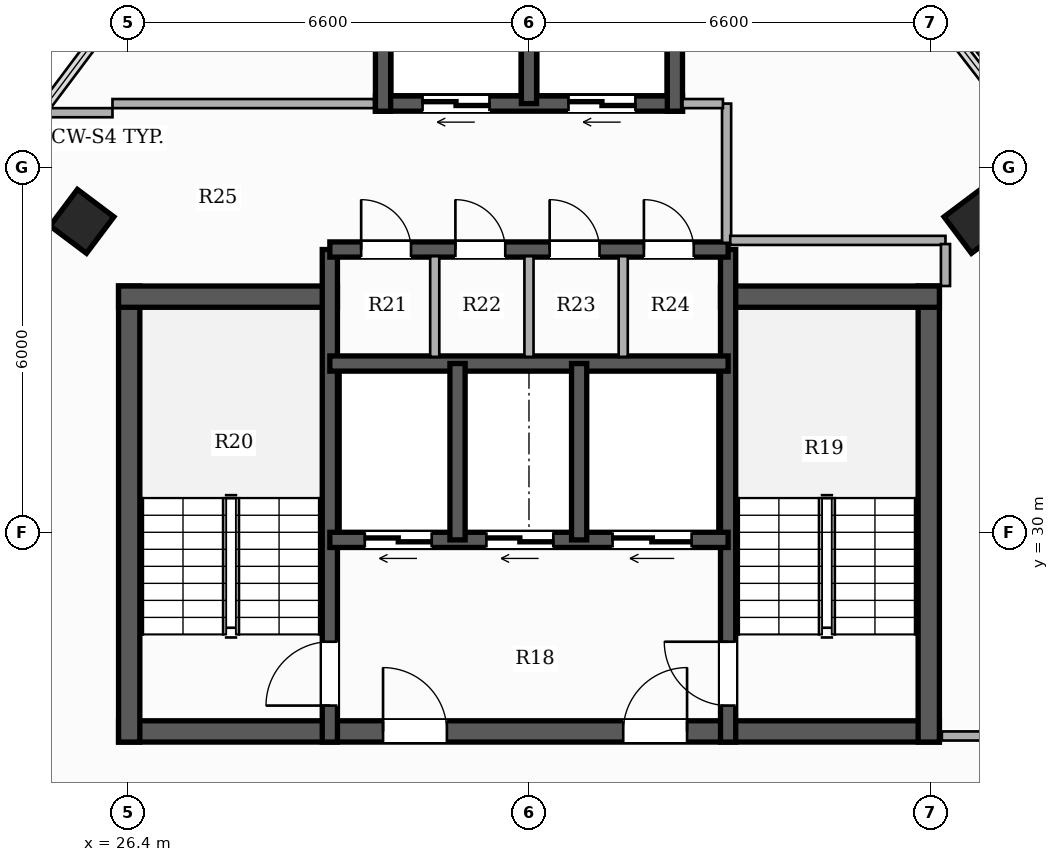
"""IFC4 building model, lengths in metres.
Left out: names, types, materials, properties, quantities, classifications, styles, units other than length and angle.
Written with IfcOpenShell. Run it as: python <this file> out.ifc"""

import sys

from ifc_helpers import new_model, si_unit, direction, frame, frame_2d, origin, origin_2d, place, context, subcontext, project, spatial, rectangle, hollow_rectangle, extrude, element, fill, save


model = new_model("IFC4")
c1 = context("Model", 3, precision=1e-05, world=origin(), true_north=direction((0.0, 1.0)))
c2 = subcontext(c1, "Body", "Model", "MODEL_VIEW")
j1 = project(units=[si_unit("LENGTHUNIT", "METRE"), si_unit("PLANEANGLEUNIT", "RADIAN")], contexts=[c1])
p1 = place(None, origin())
s1 = spatial("IfcSite", under=j1, at=p1, CompositionType="ELEMENT")
p2 = place(p1, origin())
s2 = spatial("IfcBuilding", under=s1, at=p2, CompositionType="ELEMENT")
p3 = place(p2, frame((0.0, 0.0, 246.95)))
s3 = spatial("IfcBuildingStorey", under=s2, at=p3, CompositionType="ELEMENT", Elevation=246.95)
p4 = place(p3, frame((26.25, 26.725, 0.0), z_axis=(0.0, 0.0, 1.0), x_axis=(1.0, 0.0, 0.0)))
e1 = element("IfcWall", 1, at=p4, inside=s3, PredefinedType="SHEAR", context=c2, shape_type="SweptSolid", body=[
    extrude(rectangle(XDim=13.5, YDim=0.35, at=frame_2d((6.75, 0.0))), origin(), (0.0, 0.0, 1.0), 3.3),
])
p5 = place(p4, frame((4.35, 0.0, 0.0)))
e2 = element("IfcOpeningElement", 2, at=p5, cuts=e1, PredefinedType="OPENING", context=c2, shape_type="SweptSolid", body=[
    extrude(rectangle(XDim=1.05, YDim=2.15, at=frame_2d((0.525, 1.075))), frame((0.0, 0.185, 0.0), z_axis=(0.0, -1.0, 0.0), x_axis=(1.0, 0.0, 0.0)), (0.0, 0.0, 1.0), 0.37),
])
p6 = place(p4, frame((8.3, 0.0, 0.0)))
e3 = element("IfcOpeningElement", 3, at=p6, cuts=e1, PredefinedType="OPENING", context=c2, shape_type="SweptSolid", body=[
    extrude(rectangle(XDim=1.05, YDim=2.15, at=frame_2d((0.525, 1.075))), frame((0.0, 0.185, 0.0), z_axis=(0.0, -1.0, 0.0), x_axis=(1.0, 0.0, 0.0)), (0.0, 0.0, 1.0), 0.37),
])
p7 = place(p3, frame((26.425, 26.55, 0.0), z_axis=(0.0, 0.0, 1.0), x_axis=(0.0, 1.0, 0.0)))
e4 = element("IfcWall", 4, at=p7, inside=s3, PredefinedType="SHEAR", context=c2, shape_type="SweptSolid", body=[
    extrude(rectangle(XDim=7.5, YDim=0.35, at=frame_2d((3.75, 0.0))), origin(), (0.0, 0.0, 1.0), 3.3),
])
p8 = place(p3, frame((26.25, 33.875, 0.0), z_axis=(0.0, 0.0, 1.0), x_axis=(1.0, 0.0, 0.0)))
e5 = element("IfcWall", 5, at=p8, inside=s3, PredefinedType="SHEAR", context=c2, shape_type="SweptSolid", body=[
    extrude(rectangle(XDim=3.6, YDim=0.35, at=frame_2d((1.8, 0.0))), origin(), (0.0, 0.0, 1.0), 3.3),
])
p9 = place(p3, frame((39.575, 26.55, 0.0), z_axis=(0.0, 0.0, 1.0), x_axis=(0.0, 1.0, 0.0)))
e6 = element("IfcWall", 6, at=p9, inside=s3, PredefinedType="SHEAR", context=c2, shape_type="SweptSolid", body=[
    extrude(rectangle(XDim=7.5, YDim=0.35, at=frame_2d((3.75, 0.0))), origin(), (0.0, 0.0, 1.0), 3.3),
])
p10 = place(p3, frame((36.15, 33.875, 0.0), z_axis=(0.0, 0.0, 1.0), x_axis=(1.0, 0.0, 0.0)))
e7 = element("IfcWall", 7, at=p10, inside=s3, PredefinedType="SHEAR", context=c2, shape_type="SweptSolid", body=[
    extrude(rectangle(XDim=3.6, YDim=0.35, at=frame_2d((1.8, 0.0))), origin(), (0.0, 0.0, 1.0), 3.3),
])
p11 = place(p3, frame((29.725, 26.55, 0.0), z_axis=(0.0, 0.0, 1.0), x_axis=(0.0, 1.0, 0.0)))
e8 = element("IfcWall", 8, at=p11, inside=s3, PredefinedType="SHEAR", context=c2, shape_type="SweptSolid", body=[
    extrude(rectangle(XDim=8.1, YDim=0.25, at=frame_2d((4.05, 0.0))), origin(), (0.0, 0.0, 1.0), 3.3),
])
p12 = place(p11, frame((0.6, 0.0, 0.0)))
e9 = element("IfcOpeningElement", 9, at=p12, cuts=e8, PredefinedType="OPENING", context=c2, shape_type="SweptSolid", body=[
    extrude(rectangle(XDim=1.05, YDim=2.15, at=frame_2d((0.525, 1.075))), frame((0.0, 0.135, 0.0), z_axis=(0.0, -1.0, 0.0), x_axis=(1.0, 0.0, 0.0)), (0.0, 0.0, 1.0), 0.27),
])
p13 = place(p3, frame((36.275, 26.55, 0.0), z_axis=(0.0, 0.0, 1.0), x_axis=(0.0, 1.0, 0.0)))
e10 = element("IfcWall", 10, at=p13, inside=s3, PredefinedType="SHEAR", context=c2, shape_type="SweptSolid", body=[
    extrude(rectangle(XDim=8.1, YDim=0.25, at=frame_2d((4.05, 0.0))), origin(), (0.0, 0.0, 1.0), 3.3),
])
p14 = place(p13, frame((0.6, 0.0, 0.0)))
e11 = element("IfcOpeningElement", 11, at=p14, cuts=e10, PredefinedType="OPENING", context=c2, shape_type="SweptSolid", body=[
    extrude(rectangle(XDim=1.05, YDim=2.15, at=frame_2d((0.525, 1.075))), frame((0.0, 0.135, 0.0), z_axis=(0.0, -1.0, 0.0), x_axis=(1.0, 0.0, 0.0)), (0.0, 0.0, 1.0), 0.27),
])
p15 = place(p3, frame((36.275, 29.875, 0.0), z_axis=(0.0, 0.0, 1.0), x_axis=(-1.0, 0.0, 0.0)))
e12 = element("IfcWall", 12, at=p15, inside=s3, PredefinedType="SHEAR", context=c2, shape_type="SweptSolid", body=[
    extrude(rectangle(XDim=6.55, YDim=0.25, at=frame_2d((3.275, 0.0))), origin(), (0.0, 0.0, 1.0), 3.3),
])
p16 = place(p15, frame((4.875, 0.0, 0.0)))
e13 = element("IfcOpeningElement", 13, at=p16, cuts=e12, PredefinedType="OPENING", context=c2, shape_type="SweptSolid", body=[
    extrude(rectangle(XDim=1.1, YDim=2.2, at=frame_2d((0.55, 1.1))), frame((0.0, 0.135, 0.0), z_axis=(0.0, -1.0, 0.0), x_axis=(1.0, 0.0, 0.0)), (0.0, 0.0, 1.0), 0.27),
])
p17 = place(p15, frame((2.875, 0.0, 0.0)))
e14 = element("IfcOpeningElement", 14, at=p17, cuts=e12, PredefinedType="OPENING", context=c2, shape_type="SweptSolid", body=[
    extrude(rectangle(XDim=1.1, YDim=2.2, at=frame_2d((0.55, 1.1))), frame((0.0, 0.135, 0.0), z_axis=(0.0, -1.0, 0.0), x_axis=(1.0, 0.0, 0.0)), (0.0, 0.0, 1.0), 0.27),
])
p18 = place(p15, frame((0.6, 0.0, 0.0)))
e15 = element("IfcOpeningElement", 15, at=p18, cuts=e12, PredefinedType="OPENING", context=c2, shape_type="SweptSolid", body=[
    extrude(rectangle(XDim=1.3, YDim=2.2, at=frame_2d((0.65, 1.1))), frame((0.0, 0.135, 0.0), z_axis=(0.0, -1.0, 0.0), x_axis=(1.0, 0.0, 0.0)), (0.0, 0.0, 1.0), 0.27),
])
p19 = place(p3, frame((29.725, 32.775, 0.0), z_axis=(0.0, 0.0, 1.0), x_axis=(1.0, 0.0, 0.0)))
e16 = element("IfcWall", 16, at=p19, inside=s3, PredefinedType="SHEAR", context=c2, shape_type="SweptSolid", body=[
    extrude(rectangle(XDim=6.55, YDim=0.25, at=frame_2d((3.275, 0.0))), origin(), (0.0, 0.0, 1.0), 3.3),
])
for number, where, z_axis, x_axis in (
    (17, (31.825, 29.875, 0.0), (0.0, 0.0, 1.0), (0.0, 1.0, 0.0)),
    (18, (33.825, 29.875, 0.0), (0.0, 0.0, 1.0), (0.0, 1.0, 0.0)),
):
    element("IfcWall", number, at=place(p3, frame(where, z_axis=z_axis, x_axis=x_axis)), inside=s3, PredefinedType="SHEAR", context=c2, shape_type="SweptSolid", body=[
        extrude(rectangle(XDim=2.9, YDim=0.25, at=frame_2d((1.45, 0.0))), origin(), (0.0, 0.0, 1.0), 3.3),
    ])
p20 = place(p3, frame((29.725, 34.65, 0.0), z_axis=(0.0, 0.0, 1.0), x_axis=(1.0, 0.0, 0.0)))
e19 = element("IfcWall", 19, at=p20, inside=s3, PredefinedType="SHEAR", context=c2, shape_type="SweptSolid", body=[
    extrude(rectangle(XDim=6.55, YDim=0.25, at=frame_2d((3.275, 0.0))), origin(), (0.0, 0.0, 1.0), 3.3),
])
p21 = place(p20, frame((0.515, 0.0, 0.0)))
e20 = element("IfcOpeningElement", 20, at=p21, cuts=e19, PredefinedType="OPENING", context=c2, shape_type="SweptSolid", body=[
    extrude(rectangle(XDim=0.82, YDim=2.1, at=frame_2d((0.41, 1.05))), frame((0.0, 0.135, 0.0), z_axis=(0.0, -1.0, 0.0), x_axis=(1.0, 0.0, 0.0)), (0.0, 0.0, 1.0), 0.27),
])
p22 = place(p20, frame((2.065, 0.0, 0.0)))
e21 = element("IfcOpeningElement", 21, at=p22, cuts=e19, PredefinedType="OPENING", context=c2, shape_type="SweptSolid", body=[
    extrude(rectangle(XDim=0.82, YDim=2.1, at=frame_2d((0.41, 1.05))), frame((0.0, 0.135, 0.0), z_axis=(0.0, -1.0, 0.0), x_axis=(1.0, 0.0, 0.0)), (0.0, 0.0, 1.0), 0.27),
])
p23 = place(p20, frame((3.615, 0.0, 0.0)))
e22 = element("IfcOpeningElement", 22, at=p23, cuts=e19, PredefinedType="OPENING", context=c2, shape_type="SweptSolid", body=[
    extrude(rectangle(XDim=0.82, YDim=2.1, at=frame_2d((0.41, 1.05))), frame((0.0, 0.135, 0.0), z_axis=(0.0, -1.0, 0.0), x_axis=(1.0, 0.0, 0.0)), (0.0, 0.0, 1.0), 0.27),
])
p24 = place(p20, frame((5.165, 0.0, 0.0)))
e23 = element("IfcOpeningElement", 23, at=p24, cuts=e19, PredefinedType="OPENING", context=c2, shape_type="SweptSolid", body=[
    extrude(rectangle(XDim=0.82, YDim=2.1, at=frame_2d((0.41, 1.05))), frame((0.0, 0.135, 0.0), z_axis=(0.0, -1.0, 0.0), x_axis=(1.0, 0.0, 0.0)), (0.0, 0.0, 1.0), 0.27),
])
p25 = place(p3, frame((35.525, 37.05, 0.0), z_axis=(0.0, 0.0, 1.0), x_axis=(-1.0, 0.0, 0.0)))
e24 = element("IfcWall", 24, at=p25, inside=s3, PredefinedType="SHEAR", context=c2, shape_type="SweptSolid", body=[
    extrude(rectangle(XDim=5.05, YDim=0.25, at=frame_2d((2.525, 0.0))), origin(), (0.0, 0.0, 1.0), 3.3),
])
p26 = place(p25, frame((3.175, 0.0, 0.0)))
e25 = element("IfcOpeningElement", 25, at=p26, cuts=e24, PredefinedType="OPENING", context=c2, shape_type="SweptSolid", body=[
    extrude(rectangle(XDim=1.1, YDim=2.2, at=frame_2d((0.55, 1.1))), frame((0.0, 0.135, 0.0), z_axis=(0.0, -1.0, 0.0), x_axis=(1.0, 0.0, 0.0)), (0.0, 0.0, 1.0), 0.27),
])
p27 = place(p25, frame((0.775, 0.0, 0.0)))
e26 = element("IfcOpeningElement", 26, at=p27, cuts=e24, PredefinedType="OPENING", context=c2, shape_type="SweptSolid", body=[
    extrude(rectangle(XDim=1.1, YDim=2.2, at=frame_2d((0.55, 1.1))), frame((0.0, 0.135, 0.0), z_axis=(0.0, -1.0, 0.0), x_axis=(1.0, 0.0, 0.0)), (0.0, 0.0, 1.0), 0.27),
])
for number, where, z_axis, x_axis in (
    (27, (30.6, 36.925, 0.0), (0.0, 0.0, 1.0), (0.0, 1.0, 0.0)),
    (28, (35.4, 36.925, 0.0), (0.0, 0.0, 1.0), (0.0, 1.0, 0.0)),
):
    element("IfcWall", number, at=place(p3, frame(where, z_axis=z_axis, x_axis=x_axis)), inside=s3, PredefinedType="SHEAR", context=c2, shape_type="SweptSolid", body=[
        extrude(rectangle(XDim=2.8, YDim=0.25, at=frame_2d((1.4, 0.0))), origin(), (0.0, 0.0, 1.0), 3.3),
    ])
p28 = place(p3, frame((33.0, 37.05, 0.0), z_axis=(0.0, 0.0, 1.0), x_axis=(0.0, 1.0, 0.0)))
e29 = element("IfcWall", 29, at=p28, inside=s3, PredefinedType="SHEAR", context=c2, shape_type="SweptSolid", body=[
    extrude(rectangle(XDim=2.55, YDim=0.25, at=frame_2d((1.275, 0.0))), origin(), (0.0, 0.0, 1.0), 3.3),
])
for number, where, z_axis, x_axis in (
    (30, (25.648, 35.113, 0.0), (0.0, 0.0, 1.0), (0.6, 0.8, 0.0)),
    (31, (40.352, 35.113, 0.0), (0.0, 0.0, 1.0), (-0.6, 0.8, 0.0)),
):
    element("IfcColumn", number, at=place(p3, frame(where, z_axis=z_axis, x_axis=x_axis)), inside=s3, PredefinedType="COLUMN", context=c2, shape_type="SweptSolid", body=[
        extrude(hollow_rectangle(XDim=0.75, YDim=0.75, WallThickness=0.025, at=origin_2d()), origin(), (0.0, 0.0, 1.0), 3.3),
    ])
p29 = place(p3, frame((36.25, 34.76, 0.0), z_axis=(0.0, 0.0, 1.0), x_axis=(0.0, 1.0, 0.0)))
e32 = element("IfcWall", 32, at=p29, inside=s3, PredefinedType="PARTITIONING", context=c2, shape_type="SweptSolid", body=[
    extrude(rectangle(XDim=2.29, YDim=0.15, at=frame_2d((1.145, 0.0))), origin(), (0.0, 0.0, 1.0), 2.425),
])
p30 = place(p3, frame((35.525, 37.05, 0.0), z_axis=(0.0, 0.0, 1.0), x_axis=(1.0, 0.0, 0.0)))
e33 = element("IfcWall", 33, at=p30, inside=s3, PredefinedType="PARTITIONING", context=c2, shape_type="SweptSolid", body=[
    extrude(rectangle(XDim=0.665, YDim=0.15, at=frame_2d((0.333, 0.0))), origin(), (0.0, 0.0, 1.0), 2.425),
])
for number, where, z_axis, x_axis in (
    (34, (31.45, 32.885, 0.0), (0.0, 0.0, 1.0), (0.0, 1.0, 0.0)),
    (35, (33.0, 32.885, 0.0), (0.0, 0.0, 1.0), (0.0, 1.0, 0.0)),
    (36, (34.55, 32.885, 0.0), (0.0, 0.0, 1.0), (0.0, 1.0, 0.0)),
):
    element("IfcWall", number, at=place(p3, frame(where, z_axis=z_axis, x_axis=x_axis)), inside=s3, PredefinedType="PARTITIONING", context=c2, shape_type="SweptSolid", body=[
        extrude(rectangle(XDim=1.655, YDim=0.15, at=frame_2d((0.828, 0.0))), origin(), (0.0, 0.0, 1.0), 3.06),
    ])
p31 = place(p3, frame((24.846, 36.9, 0.0), z_axis=(0.0, 0.0, 1.0), x_axis=(1.0, 0.0, 0.0)))
e37 = element("IfcWall", 37, at=p31, inside=s3, PredefinedType="PARTITIONING", context=c2, shape_type="SweptSolid", body=[
    extrude(rectangle(XDim=1.304, YDim=0.15, at=frame_2d((0.652, 0.0))), origin(), (0.0, 0.0, 1.0), 3.06),
])
p32 = place(p3, frame((39.79, 26.65, 0.0), z_axis=(0.0, 0.0, 1.0), x_axis=(1.0, 0.0, 0.0)))
e38 = element("IfcWall", 38, at=p32, inside=s3, PredefinedType="PARTITIONING", context=c2, shape_type="SweptSolid", body=[
    extrude(rectangle(XDim=2.46, YDim=0.15, at=frame_2d((1.23, 0.0))), origin(), (0.0, 0.0, 1.0), 2.565),
])
p33 = place(p3, frame((26.15, 37.05, 0.0), z_axis=(0.0, 0.0, 1.0), x_axis=(1.0, 0.0, 0.0)))
e39 = element("IfcWall", 39, at=p33, inside=s3, PredefinedType="PARTITIONING", context=c2, shape_type="SweptSolid", body=[
    extrude(rectangle(XDim=4.3, YDim=0.15, at=frame_2d((2.15, 0.0))), origin(), (0.0, 0.0, 1.0), 2.425),
])
p34 = place(p3, frame((36.31, 34.8, 0.0), z_axis=(0.0, 0.0, 1.0), x_axis=(1.0, 0.0, 0.0)))
e40 = element("IfcWall", 40, at=p34, inside=s3, PredefinedType="PARTITIONING", context=c2, shape_type="SweptSolid", body=[
    extrude(rectangle(XDim=3.54, YDim=0.15, at=frame_2d((1.77, 0.0))), origin(), (0.0, 0.0, 1.0), 2.425),
])
p35 = place(p3, frame((39.85, 34.74, 0.0), z_axis=(0.0, 0.0, 1.0), x_axis=(0.0, -1.0, 0.0)))
e41 = element("IfcWall", 41, at=p35, inside=s3, PredefinedType="PARTITIONING", context=c2, shape_type="SweptSolid", body=[
    extrude(rectangle(XDim=0.69, YDim=0.15, at=frame_2d((0.345, 0.0))), origin(), (0.0, 0.0, 1.0), 2.773),
])
p36 = place(p12, origin())
e42 = element("IfcDoor", 42, at=p36, inside=s3, OperationType="SINGLE_SWING_LEFT", PredefinedType="DOOR", context=c2, shape_type="SweptSolid", body=[
    extrude(rectangle(XDim=1.05, YDim=2.15, at=frame_2d((0.525, 1.075))), frame((0.0, 0.025, 0.0), z_axis=(0.0, -1.0, 0.0), x_axis=(1.0, 0.0, 0.0)), (0.0, 0.0, 1.0), 0.05),
])
fill(e9, e42)
p37 = place(p14, origin())
e43 = element("IfcDoor", 43, at=p37, inside=s3, OperationType="SINGLE_SWING_RIGHT", PredefinedType="DOOR", context=c2, shape_type="SweptSolid", body=[
    extrude(rectangle(XDim=1.05, YDim=2.15, at=frame_2d((0.525, 1.075))), frame((0.0, 0.025, 0.0), z_axis=(0.0, -1.0, 0.0), x_axis=(1.0, 0.0, 0.0)), (0.0, 0.0, 1.0), 0.05),
])
fill(e11, e43)
p38 = place(p5, origin())
e44 = element("IfcDoor", 44, at=p38, inside=s3, OperationType="SINGLE_SWING_LEFT", PredefinedType="DOOR", context=c2, shape_type="SweptSolid", body=[
    extrude(rectangle(XDim=1.05, YDim=2.15, at=frame_2d((0.525, 1.075))), frame((0.0, 0.025, 0.0), z_axis=(0.0, -1.0, 0.0), x_axis=(1.0, 0.0, 0.0)), (0.0, 0.0, 1.0), 0.05),
])
fill(e2, e44)
p39 = place(p6, origin())
e45 = element("IfcDoor", 45, at=p39, inside=s3, OperationType="SINGLE_SWING_RIGHT", PredefinedType="DOOR", context=c2, shape_type="SweptSolid", body=[
    extrude(rectangle(XDim=1.05, YDim=2.15, at=frame_2d((0.525, 1.075))), frame((0.0, 0.025, 0.0), z_axis=(0.0, -1.0, 0.0), x_axis=(1.0, 0.0, 0.0)), (0.0, 0.0, 1.0), 0.05),
])
fill(e3, e45)
p40 = place(p16, origin())
e46 = element("IfcDoor", 46, at=p40, inside=s3, OperationType="DOUBLE_DOOR_SLIDING", PredefinedType="DOOR", context=c2, shape_type="SweptSolid", body=[
    extrude(rectangle(XDim=1.1, YDim=2.2, at=frame_2d((0.55, 1.1))), frame((0.0, 0.025, 0.0), z_axis=(0.0, -1.0, 0.0), x_axis=(1.0, 0.0, 0.0)), (0.0, 0.0, 1.0), 0.05),
])
fill(e13, e46)
p41 = place(p17, origin())
e47 = element("IfcDoor", 47, at=p41, inside=s3, OperationType="DOUBLE_DOOR_SLIDING", PredefinedType="DOOR", context=c2, shape_type="SweptSolid", body=[
    extrude(rectangle(XDim=1.1, YDim=2.2, at=frame_2d((0.55, 1.1))), frame((0.0, 0.025, 0.0), z_axis=(0.0, -1.0, 0.0), x_axis=(1.0, 0.0, 0.0)), (0.0, 0.0, 1.0), 0.05),
])
fill(e14, e47)
p42 = place(p18, origin())
e48 = element("IfcDoor", 48, at=p42, inside=s3, OperationType="DOUBLE_DOOR_SLIDING", PredefinedType="DOOR", context=c2, shape_type="SweptSolid", body=[
    extrude(rectangle(XDim=1.3, YDim=2.2, at=frame_2d((0.65, 1.1))), frame((0.0, 0.025, 0.0), z_axis=(0.0, -1.0, 0.0), x_axis=(1.0, 0.0, 0.0)), (0.0, 0.0, 1.0), 0.05),
])
fill(e15, e48)
p43 = place(p26, origin())
e49 = element("IfcDoor", 49, at=p43, inside=s3, OperationType="DOUBLE_DOOR_SLIDING", PredefinedType="DOOR", context=c2, shape_type="SweptSolid", body=[
    extrude(rectangle(XDim=1.1, YDim=2.2, at=frame_2d((0.55, 1.1))), frame((0.0, 0.025, 0.0), z_axis=(0.0, -1.0, 0.0), x_axis=(1.0, 0.0, 0.0)), (0.0, 0.0, 1.0), 0.05),
])
fill(e25, e49)
p44 = place(p27, origin())
e50 = element("IfcDoor", 50, at=p44, inside=s3, OperationType="DOUBLE_DOOR_SLIDING", PredefinedType="DOOR", context=c2, shape_type="SweptSolid", body=[
    extrude(rectangle(XDim=1.1, YDim=2.2, at=frame_2d((0.55, 1.1))), frame((0.0, 0.025, 0.0), z_axis=(0.0, -1.0, 0.0), x_axis=(1.0, 0.0, 0.0)), (0.0, 0.0, 1.0), 0.05),
])
fill(e26, e50)
p45 = place(p21, origin())
e51 = element("IfcDoor", 51, at=p45, inside=s3, OperationType="SINGLE_SWING_LEFT", PredefinedType="DOOR", context=c2, shape_type="SweptSolid", body=[
    extrude(rectangle(XDim=0.82, YDim=2.1, at=frame_2d((0.41, 1.05))), frame((0.0, 0.025, 0.0), z_axis=(0.0, -1.0, 0.0), x_axis=(1.0, 0.0, 0.0)), (0.0, 0.0, 1.0), 0.05),
])
fill(e20, e51)
p46 = place(p22, origin())
e52 = element("IfcDoor", 52, at=p46, inside=s3, OperationType="SINGLE_SWING_LEFT", PredefinedType="DOOR", context=c2, shape_type="SweptSolid", body=[
    extrude(rectangle(XDim=0.82, YDim=2.1, at=frame_2d((0.41, 1.05))), frame((0.0, 0.025, 0.0), z_axis=(0.0, -1.0, 0.0), x_axis=(1.0, 0.0, 0.0)), (0.0, 0.0, 1.0), 0.05),
])
fill(e21, e52)
p47 = place(p23, origin())
e53 = element("IfcDoor", 53, at=p47, inside=s3, OperationType="SINGLE_SWING_LEFT", PredefinedType="DOOR", context=c2, shape_type="SweptSolid", body=[
    extrude(rectangle(XDim=0.82, YDim=2.1, at=frame_2d((0.41, 1.05))), frame((0.0, 0.025, 0.0), z_axis=(0.0, -1.0, 0.0), x_axis=(1.0, 0.0, 0.0)), (0.0, 0.0, 1.0), 0.05),
])
fill(e22, e53)
p48 = place(p24, origin())
e54 = element("IfcDoor", 54, at=p48, inside=s3, OperationType="SINGLE_SWING_LEFT", PredefinedType="DOOR", context=c2, shape_type="SweptSolid", body=[
    extrude(rectangle(XDim=0.82, YDim=2.1, at=frame_2d((0.41, 1.05))), frame((0.0, 0.025, 0.0), z_axis=(0.0, -1.0, 0.0), x_axis=(1.0, 0.0, 0.0)), (0.0, 0.0, 1.0), 0.05),
])
fill(e23, e54)
save(model, sys.argv[1])
